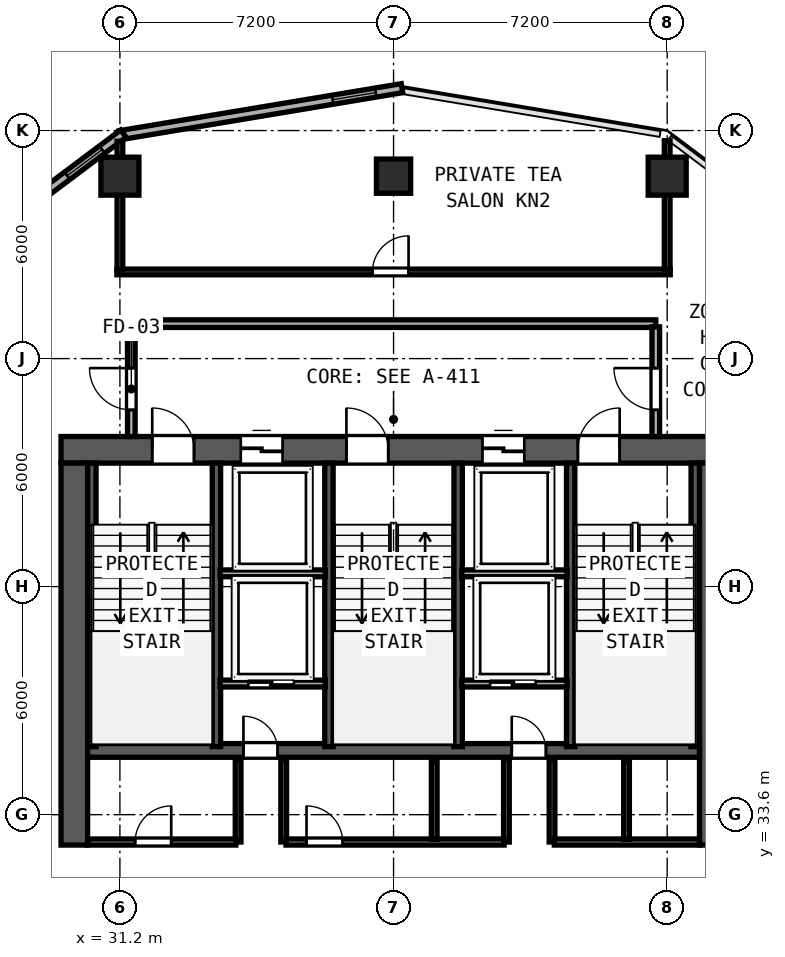
"""IFC4 building model, lengths in metres.
Left out: names, types, materials, properties, quantities, classifications, styles, units other than length and angle.
Written with IfcOpenShell. Run it as: python <this file> out.ifc"""

import sys

from ifc_helpers import new_model, si_unit, direction, frame, frame_2d, origin, origin_2d, place, context, subcontext, project, spatial, rectangle, hollow_rectangle, extrude, element, fill, save


model = new_model("IFC4")
c1 = context("Model", 3, precision=1e-05, world=origin(), true_north=direction((0.0, 1.0)))
c2 = subcontext(c1, "Body", "Model", "MODEL_VIEW")
j1 = project(units=[si_unit("LENGTHUNIT", "METRE"), si_unit("PLANEANGLEUNIT", "RADIAN")], contexts=[c1])
p1 = place(None, origin())
s1 = spatial("IfcSite", under=j1, at=p1, CompositionType="ELEMENT")
p2 = place(p1, origin())
s2 = spatial("IfcBuilding", under=s1, at=p2, CompositionType="ELEMENT")
p3 = place(p2, frame((0.0, 0.0, 128.8)))
s3 = spatial("IfcBuildingStorey", under=s2, at=p3, CompositionType="ELEMENT", Elevation=128.8)
p4 = place(p3, frame((29.65, 43.2, 0.0), z_axis=(0.0, 0.0, 1.0), x_axis=(1.0, 0.0, 0.0)))
e1 = element("IfcWall", 1, at=p4, inside=s3, PredefinedType="SHEAR", context=c2, shape_type="SweptSolid", body=[
    extrude(rectangle(XDim=17.5, YDim=0.7, at=frame_2d((8.75, 0.0))), origin(), (0.0, 0.0, 1.0), 3.6),
])
p5 = place(p4, frame((2.4, 0.0, 0.0)))
e2 = element("IfcOpeningElement", 2, at=p5, cuts=e1, PredefinedType="OPENING", context=c2, shape_type="SweptSolid", body=[
    extrude(rectangle(XDim=1.1, YDim=2.15, at=frame_2d((0.55, 1.075))), frame((0.0, 0.36, 0.0), z_axis=(0.0, -1.0, 0.0), x_axis=(1.0, 0.0, 0.0)), (0.0, 0.0, 1.0), 0.72),
])
p6 = place(p4, frame((7.51, 0.0, 0.0)))
e3 = element("IfcOpeningElement", 3, at=p6, cuts=e1, PredefinedType="OPENING", context=c2, shape_type="SweptSolid", body=[
    extrude(rectangle(XDim=1.1, YDim=2.15, at=frame_2d((0.55, 1.075))), frame((0.0, 0.36, 0.0), z_axis=(0.0, -1.0, 0.0), x_axis=(1.0, 0.0, 0.0)), (0.0, 0.0, 1.0), 0.72),
])
p7 = place(p4, frame((13.6, 0.0, 0.0)))
e4 = element("IfcOpeningElement", 4, at=p7, cuts=e1, PredefinedType="OPENING", context=c2, shape_type="SweptSolid", body=[
    extrude(rectangle(XDim=1.1, YDim=2.15, at=frame_2d((0.55, 1.075))), frame((0.0, 0.36, 0.0), z_axis=(0.0, -1.0, 0.0), x_axis=(1.0, 0.0, 0.0)), (0.0, 0.0, 1.0), 0.72),
])
p8 = place(p4, frame((4.73, 0.0, 0.0)))
e5 = element("IfcOpeningElement", 5, at=p8, cuts=e1, PredefinedType="OPENING", context=c2, shape_type="SweptSolid", body=[
    extrude(rectangle(XDim=1.1, YDim=2.2, at=frame_2d((0.55, 1.1))), frame((0.0, 0.36, 0.0), z_axis=(0.0, -1.0, 0.0), x_axis=(1.0, 0.0, 0.0)), (0.0, 0.0, 1.0), 0.72),
])
p9 = place(p4, frame((11.09, 0.0, 0.0)))
e6 = element("IfcOpeningElement", 6, at=p9, cuts=e1, PredefinedType="OPENING", context=c2, shape_type="SweptSolid", body=[
    extrude(rectangle(XDim=1.1, YDim=2.2, at=frame_2d((0.55, 1.1))), frame((0.0, 0.36, 0.0), z_axis=(0.0, -1.0, 0.0), x_axis=(1.0, 0.0, 0.0)), (0.0, 0.0, 1.0), 0.72),
])
for number, where, z_axis, x_axis in (
    (7, (30.0, 32.8, 0.0), (0.0, 0.0, 1.0), (0.0, 1.0, 0.0)),
    (8, (46.8, 32.8, 0.0), (0.0, 0.0, 1.0), (0.0, 1.0, 0.0)),
):
    element("IfcWall", number, at=place(p3, frame(where, z_axis=z_axis, x_axis=x_axis)), inside=s3, PredefinedType="SHEAR", context=c2, shape_type="SweptSolid", body=[
        extrude(rectangle(XDim=10.05, YDim=0.7, at=frame_2d((5.025, 0.0))), origin(), (0.0, 0.0, 1.0), 3.6),
    ])
p10 = place(p3, frame((30.35, 35.29, 0.0), z_axis=(0.0, 0.0, 1.0), x_axis=(1.0, 0.0, 0.0)))
e9 = element("IfcWall", 9, at=p10, inside=s3, PredefinedType="SHEAR", context=c2, shape_type="SweptSolid", body=[
    extrude(rectangle(XDim=16.1, YDim=0.36, at=frame_2d((8.05, 0.0))), origin(), (0.0, 0.0, 1.0), 3.6),
])
p11 = place(p10, frame((5.0, 0.0, 0.0), z_axis=(0.0, 0.0, 1.0), x_axis=(-1.0, 0.0, 0.0)))
e10 = element("IfcOpeningElement", 10, at=p11, cuts=e9, PredefinedType="OPENING", context=c2, shape_type="SweptSolid", body=[
    extrude(rectangle(XDim=0.9, YDim=2.1, at=frame_2d((0.45, 1.05))), frame((0.0, 0.19, 0.0), z_axis=(0.0, -1.0, 0.0), x_axis=(1.0, 0.0, 0.0)), (0.0, 0.0, 1.0), 0.38),
])
p12 = place(p10, frame((12.06, 0.0, 0.0), z_axis=(0.0, 0.0, 1.0), x_axis=(-1.0, 0.0, 0.0)))
e11 = element("IfcOpeningElement", 11, at=p12, cuts=e9, PredefinedType="OPENING", context=c2, shape_type="SweptSolid", body=[
    extrude(rectangle(XDim=0.9, YDim=2.1, at=frame_2d((0.45, 1.05))), frame((0.0, 0.19, 0.0), z_axis=(0.0, -1.0, 0.0), x_axis=(1.0, 0.0, 0.0)), (0.0, 0.0, 1.0), 0.38),
])
for number, where, z_axis, x_axis in (
    (12, (30.462, 35.39, 0.0), (0.0, 0.0, 1.0), (0.0, 1.0, 0.0)),
    (13, (33.74, 35.39, 0.0), (0.0, 0.0, 1.0), (0.0, 1.0, 0.0)),
    (14, (36.7, 35.39, 0.0), (0.0, 0.0, 1.0), (0.0, 1.0, 0.0)),
    (15, (40.1, 35.39, 0.0), (0.0, 0.0, 1.0), (0.0, 1.0, 0.0)),
    (16, (43.06, 35.39, 0.0), (0.0, 0.0, 1.0), (0.0, 1.0, 0.0)),
    (17, (46.338, 35.39, 0.0), (0.0, 0.0, 1.0), (0.0, 1.0, 0.0)),
):
    element("IfcWall", number, at=place(p3, frame(where, z_axis=z_axis, x_axis=x_axis)), inside=s3, PredefinedType="SHEAR", context=c2, shape_type="SweptSolid", body=[
        extrude(rectangle(XDim=7.46, YDim=0.22, at=frame_2d((3.73, 0.0))), origin(), (0.0, 0.0, 1.0), 3.6),
    ])
for number, where, z_axis, x_axis in (
    (18, (31.2, 50.4, 0.0), (0.0, 0.0, 1.0), (1.0, 0.0, 0.0)),
    (19, (45.6, 50.4, 0.0), (0.0, 0.0, 1.0), (1.0, 0.0, 0.0)),
):
    element("IfcColumn", number, at=place(p3, frame(where, z_axis=z_axis, x_axis=x_axis)), inside=s3, PredefinedType="COLUMN", context=c2, shape_type="SweptSolid", body=[
        extrude(hollow_rectangle(XDim=1.0, YDim=1.0, WallThickness=0.038, at=origin_2d()), origin(), (0.0, 0.0, 1.0), 3.8),
    ])
p13 = place(p3, frame((38.4, 50.4, 0.0), z_axis=(0.0, 0.0, 1.0), x_axis=(1.0, 0.0, 0.0)))
e20 = element("IfcColumn", 20, at=p13, inside=s3, PredefinedType="COLUMN", context=c2, shape_type="SweptSolid", body=[
    extrude(hollow_rectangle(XDim=0.9, YDim=0.9, WallThickness=0.034, at=origin_2d()), origin(), (0.0, 0.0, 1.0), 3.8),
])
p14 = place(p3, frame((38.622, 52.715, 0.0), z_axis=(0.0, 0.0, 1.0), x_axis=(-0.98639129485, -0.164414760418, 0.0)))
e21 = element("IfcWall", 21, at=p14, inside=s3, PredefinedType="SOLIDWALL", context=c2, shape_type="SweptSolid", body=[
    extrude(rectangle(XDim=7.53, YDim=0.24, at=frame_2d((3.765, 0.0))), origin(), (0.0, 0.0, 1.0), 3.6),
])
p15 = place(p14, frame((0.7, 0.0, 0.85)))
e22 = element("IfcOpeningElement", 22, at=p15, cuts=e21, PredefinedType="OPENING", context=c2, shape_type="SweptSolid", body=[
    extrude(rectangle(XDim=1.15, YDim=1.8, at=frame_2d((0.575, 0.9))), frame((0.0, 0.13, 0.0), z_axis=(0.0, -1.0, 0.0), x_axis=(1.0, 0.0, 0.0)), (0.0, 0.0, 1.0), 0.26),
])
p16 = place(p3, frame((31.292, 51.519, 0.0), z_axis=(0.0, 0.0, 1.0), x_axis=(-0.8, -0.6, 0.0)))
e23 = element("IfcWall", 23, at=p16, inside=s3, PredefinedType="SOLIDWALL", context=c2, shape_type="SweptSolid", body=[
    extrude(rectangle(XDim=6.021, YDim=0.24, at=frame_2d((3.01, 0.0))), origin(), (0.0, 0.0, 1.0), 3.6),
])
p17 = place(p16, frame((0.7, 0.0, 0.85)))
e24 = element("IfcOpeningElement", 24, at=p17, cuts=e23, PredefinedType="OPENING", context=c2, shape_type="SweptSolid", body=[
    extrude(rectangle(XDim=1.15, YDim=1.8, at=frame_2d((0.575, 0.9))), frame((0.0, 0.13, 0.0), z_axis=(0.0, -1.0, 0.0), x_axis=(1.0, 0.0, 0.0)), (0.0, 0.0, 1.0), 0.26),
])
p18 = place(p3, frame((31.5, 46.52, 0.0), z_axis=(0.0, 0.0, 1.0), x_axis=(1.0, 0.0, 0.0)))
e25 = element("IfcWall", 25, at=p18, inside=s3, PredefinedType="SOLIDWALL", context=c2, shape_type="SweptSolid", body=[
    extrude(rectangle(XDim=13.8, YDim=0.2, at=frame_2d((6.9, 0.0))), origin(), (0.0, 0.0, 1.0), 3.6),
])
p19 = place(p3, frame((31.5, 43.55, 0.0), z_axis=(0.0, 0.0, 1.0), x_axis=(0.0, 1.0, 0.0)))
e26 = element("IfcWall", 26, at=p19, inside=s3, PredefinedType="SOLIDWALL", context=c2, shape_type="SweptSolid", body=[
    extrude(rectangle(XDim=2.885, YDim=0.2, at=frame_2d((1.442, 0.0))), origin(), (0.0, 0.0, 1.0), 3.6),
])
p20 = place(p19, frame((1.8, 0.0, 0.0), z_axis=(0.0, 0.0, 1.0), x_axis=(-1.0, 0.0, 0.0)))
e27 = element("IfcOpeningElement", 27, at=p20, cuts=e26, PredefinedType="OPENING", context=c2, shape_type="SweptSolid", body=[
    extrude(rectangle(XDim=1.1, YDim=2.15, at=frame_2d((0.55, 1.075))), frame((0.0, 0.11, 0.0), z_axis=(0.0, -1.0, 0.0), x_axis=(1.0, 0.0, 0.0)), (0.0, 0.0, 1.0), 0.22),
])
p21 = place(p3, frame((45.3, 43.55, 0.0), z_axis=(0.0, 0.0, 1.0), x_axis=(0.0, 1.0, 0.0)))
e28 = element("IfcWall", 28, at=p21, inside=s3, PredefinedType="SOLIDWALL", context=c2, shape_type="SweptSolid", body=[
    extrude(rectangle(XDim=2.885, YDim=0.2, at=frame_2d((1.442, 0.0))), origin(), (0.0, 0.0, 1.0), 3.6),
])
p22 = place(p21, frame((0.7, 0.0, 0.0)))
e29 = element("IfcOpeningElement", 29, at=p22, cuts=e28, PredefinedType="OPENING", context=c2, shape_type="SweptSolid", body=[
    extrude(rectangle(XDim=1.1, YDim=2.15, at=frame_2d((0.55, 1.075))), frame((0.0, 0.11, 0.0), z_axis=(0.0, -1.0, 0.0), x_axis=(1.0, 0.0, 0.0)), (0.0, 0.0, 1.0), 0.22),
])
for number, where, z_axis, x_axis in (
    (30, (33.835, 39.95, 0.0), (0.0, 0.0, 1.0), (1.0, 0.0, 0.0)),
    (31, (40.195, 39.95, 0.0), (0.0, 0.0, 1.0), (1.0, 0.0, 0.0)),
):
    element("IfcWall", number, at=place(p3, frame(where, z_axis=z_axis, x_axis=x_axis)), inside=s3, PredefinedType="SOLIDWALL", context=c2, shape_type="SweptSolid", body=[
        extrude(rectangle(XDim=2.77, YDim=0.18, at=frame_2d((1.385, 0.0))), origin(), (0.0, 0.0, 1.0), 3.6),
    ])
p23 = place(p3, frame((33.835, 37.05, 0.0), z_axis=(0.0, 0.0, 1.0), x_axis=(1.0, 0.0, 0.0)))
e32 = element("IfcWall", 32, at=p23, inside=s3, PredefinedType="SOLIDWALL", context=c2, shape_type="SweptSolid", body=[
    extrude(rectangle(XDim=2.77, YDim=0.18, at=frame_2d((1.385, 0.0))), origin(), (0.0, 0.0, 1.0), 3.6),
])
p24 = place(p23, frame((1.945, 0.0, 0.0), z_axis=(0.0, 0.0, 1.0), x_axis=(-1.0, 0.0, 0.0)))
e33 = element("IfcOpeningElement", 33, at=p24, cuts=e32, PredefinedType="OPENING", context=c2, shape_type="SweptSolid", body=[
    extrude(rectangle(XDim=1.2, YDim=2.2, at=frame_2d((0.6, 1.1))), frame((0.0, 0.1, 0.0), z_axis=(0.0, -1.0, 0.0), x_axis=(1.0, 0.0, 0.0)), (0.0, 0.0, 1.0), 0.2),
])
for number, where, z_axis, x_axis in (
    (34, (34.31, 32.88, 0.0), (0.0, 0.0, 1.0), (0.0, 1.0, 0.0)),
    (35, (35.51, 32.88, 0.0), (0.0, 0.0, 1.0), (0.0, 1.0, 0.0)),
):
    element("IfcWall", number, at=place(p3, frame(where, z_axis=z_axis, x_axis=x_axis)), inside=s3, PredefinedType="SOLIDWALL", context=c2, shape_type="SweptSolid", body=[
        extrude(rectangle(XDim=2.17, YDim=0.15, at=frame_2d((1.085, 0.0))), origin(), (0.0, 0.0, 1.0), 3.6),
    ])
p25 = place(p3, frame((40.195, 37.05, 0.0), z_axis=(0.0, 0.0, 1.0), x_axis=(1.0, 0.0, 0.0)))
e36 = element("IfcWall", 36, at=p25, inside=s3, PredefinedType="SOLIDWALL", context=c2, shape_type="SweptSolid", body=[
    extrude(rectangle(XDim=2.77, YDim=0.18, at=frame_2d((1.385, 0.0))), origin(), (0.0, 0.0, 1.0), 3.6),
])
p26 = place(p25, frame((1.945, 0.0, 0.0), z_axis=(0.0, 0.0, 1.0), x_axis=(-1.0, 0.0, 0.0)))
e37 = element("IfcOpeningElement", 37, at=p26, cuts=e36, PredefinedType="OPENING", context=c2, shape_type="SweptSolid", body=[
    extrude(rectangle(XDim=1.2, YDim=2.2, at=frame_2d((0.6, 1.1))), frame((0.0, 0.1, 0.0), z_axis=(0.0, -1.0, 0.0), x_axis=(1.0, 0.0, 0.0)), (0.0, 0.0, 1.0), 0.2),
])
for number, where, z_axis, x_axis in (
    (38, (41.37, 32.88, 0.0), (0.0, 0.0, 1.0), (0.0, 1.0, 0.0)),
    (39, (42.57, 32.88, 0.0), (0.0, 0.0, 1.0), (0.0, 1.0, 0.0)),
):
    element("IfcWall", number, at=place(p3, frame(where, z_axis=z_axis, x_axis=x_axis)), inside=s3, PredefinedType="SOLIDWALL", context=c2, shape_type="SweptSolid", body=[
        extrude(rectangle(XDim=2.17, YDim=0.15, at=frame_2d((1.085, 0.0))), origin(), (0.0, 0.0, 1.0), 3.6),
    ])
p27 = place(p3, frame((30.35, 32.88, 0.0), z_axis=(0.0, 0.0, 1.0), x_axis=(1.0, 0.0, 0.0)))
e40 = element("IfcWall", 40, at=p27, inside=s3, PredefinedType="SOLIDWALL", context=c2, shape_type="SweptSolid", body=[
    extrude(rectangle(XDim=3.9, YDim=0.16, at=frame_2d((1.95, 0.0))), origin(), (0.0, 0.0, 1.0), 3.6),
])
p28 = place(p27, frame((2.2, 0.0, 0.0), z_axis=(0.0, 0.0, 1.0), x_axis=(-1.0, 0.0, 0.0)))
e41 = element("IfcOpeningElement", 41, at=p28, cuts=e40, PredefinedType="OPENING", context=c2, shape_type="SweptSolid", body=[
    extrude(rectangle(XDim=0.95, YDim=2.12, at=frame_2d((0.475, 1.06))), frame((0.0, 0.09, 0.0), z_axis=(0.0, -1.0, 0.0), x_axis=(1.0, 0.0, 0.0)), (0.0, 0.0, 1.0), 0.18),
])
p29 = place(p3, frame((35.57, 32.88, 0.0), z_axis=(0.0, 0.0, 1.0), x_axis=(1.0, 0.0, 0.0)))
e42 = element("IfcWall", 42, at=p29, inside=s3, PredefinedType="SOLIDWALL", context=c2, shape_type="SweptSolid", body=[
    extrude(rectangle(XDim=5.74, YDim=0.16, at=frame_2d((2.87, 0.0))), origin(), (0.0, 0.0, 1.0), 3.6),
])
p30 = place(p29, frame((1.49, 0.0, 0.0), z_axis=(0.0, 0.0, 1.0), x_axis=(-1.0, 0.0, 0.0)))
e43 = element("IfcOpeningElement", 43, at=p30, cuts=e42, PredefinedType="OPENING", context=c2, shape_type="SweptSolid", body=[
    extrude(rectangle(XDim=0.95, YDim=2.12, at=frame_2d((0.475, 1.06))), frame((0.0, 0.09, 0.0), z_axis=(0.0, -1.0, 0.0), x_axis=(1.0, 0.0, 0.0)), (0.0, 0.0, 1.0), 0.18),
])
p31 = place(p3, frame((42.63, 32.88, 0.0), z_axis=(0.0, 0.0, 1.0), x_axis=(1.0, 0.0, 0.0)))
e44 = element("IfcWall", 44, at=p31, inside=s3, PredefinedType="SOLIDWALL", context=c2, shape_type="SweptSolid", body=[
    extrude(rectangle(XDim=3.82, YDim=0.16, at=frame_2d((1.91, 0.0))), origin(), (0.0, 0.0, 1.0), 3.6),
])
for number, where, z_axis, x_axis in (
    (45, (39.47, 32.95, 0.0), (0.0, 0.0, 1.0), (0.0, 1.0, 0.0)),
    (46, (44.53, 32.95, 0.0), (0.0, 0.0, 1.0), (0.0, 1.0, 0.0)),
):
    element("IfcWall", number, at=place(p3, frame(where, z_axis=z_axis, x_axis=x_axis)), inside=s3, PredefinedType="SOLIDWALL", context=c2, shape_type="SweptSolid", body=[
        extrude(rectangle(XDim=2.05, YDim=0.15, at=frame_2d((1.025, 0.0))), origin(), (0.0, 0.0, 1.0), 3.6),
    ])
p32 = place(p3, frame((31.12, 47.88, 0.0), z_axis=(0.0, 0.0, 1.0), x_axis=(1.0, 0.0, 0.0)))
e47 = element("IfcWall", 47, at=p32, inside=s3, PredefinedType="PARTITIONING", context=c2, shape_type="SweptSolid", body=[
    extrude(rectangle(XDim=14.56, YDim=0.15, at=frame_2d((7.28, 0.0))), origin(), (0.0, 0.0, 1.0), 3.6),
])
p33 = place(p32, frame((6.725, 0.0, 0.0)))
e48 = element("IfcOpeningElement", 48, at=p33, cuts=e47, PredefinedType="OPENING", context=c2, shape_type="SweptSolid", body=[
    extrude(rectangle(XDim=0.95, YDim=2.12, at=frame_2d((0.475, 1.06))), frame((0.0, 0.085, 0.0), z_axis=(0.0, -1.0, 0.0), x_axis=(1.0, 0.0, 0.0)), (0.0, 0.0, 1.0), 0.17),
])
p34 = place(p3, frame((31.2, 47.94, 0.0), z_axis=(0.0, 0.0, 1.0), x_axis=(0.0, 1.0, 0.0)))
e49 = element("IfcWall", 49, at=p34, inside=s3, PredefinedType="PARTITIONING", context=c2, shape_type="SweptSolid", body=[
    extrude(rectangle(XDim=3.379, YDim=0.15, at=frame_2d((1.689, 0.0))), origin(), (0.0, 0.0, 1.0), 3.085),
])
p35 = place(p3, frame((45.6, 47.94, 0.0), z_axis=(0.0, 0.0, 1.0), x_axis=(0.0, 1.0, 0.0)))
e50 = element("IfcWall", 50, at=p35, inside=s3, PredefinedType="PARTITIONING", context=c2, shape_type="SweptSolid", body=[
    extrude(rectangle(XDim=3.395, YDim=0.15, at=frame_2d((1.698, 0.0))), origin(), (0.0, 0.0, 1.0), 3.085),
])
p36 = place(p15, origin())
e51 = element("IfcWindow", 51, at=p36, inside=s3, PartitioningType="SINGLE_PANEL", PredefinedType="WINDOW", context=c2, shape_type="SweptSolid", body=[
    extrude(rectangle(XDim=1.15, YDim=1.8, at=frame_2d((0.575, 0.9))), frame((0.0, 0.03, 0.0), z_axis=(0.0, -1.0, 0.0), x_axis=(1.0, 0.0, 0.0)), (0.0, 0.0, 1.0), 0.06),
])
fill(e22, e51)
p37 = place(p17, origin())
e52 = element("IfcWindow", 52, at=p37, inside=s3, PartitioningType="SINGLE_PANEL", PredefinedType="WINDOW", context=c2, shape_type="SweptSolid", body=[
    extrude(rectangle(XDim=1.15, YDim=1.8, at=frame_2d((0.575, 0.9))), frame((0.0, 0.03, 0.0), z_axis=(0.0, -1.0, 0.0), x_axis=(1.0, 0.0, 0.0)), (0.0, 0.0, 1.0), 0.06),
])
fill(e24, e52)
p38 = place(p5, origin())
e53 = element("IfcDoor", 53, at=p38, inside=s3, OperationType="SINGLE_SWING_LEFT", PredefinedType="DOOR", context=c2, shape_type="SweptSolid", body=[
    extrude(rectangle(XDim=1.1, YDim=2.15, at=frame_2d((0.55, 1.075))), frame((0.0, 0.185, 0.0), z_axis=(0.0, -1.0, 0.0), x_axis=(1.0, 0.0, 0.0)), (0.0, 0.0, 1.0), 0.05),
])
fill(e2, e53)
p39 = place(p6, origin())
e54 = element("IfcDoor", 54, at=p39, inside=s3, OperationType="SINGLE_SWING_LEFT", PredefinedType="DOOR", context=c2, shape_type="SweptSolid", body=[
    extrude(rectangle(XDim=1.1, YDim=2.15, at=frame_2d((0.55, 1.075))), frame((0.0, 0.185, 0.0), z_axis=(0.0, -1.0, 0.0), x_axis=(1.0, 0.0, 0.0)), (0.0, 0.0, 1.0), 0.05),
])
fill(e3, e54)
p40 = place(p7, origin())
e55 = element("IfcDoor", 55, at=p40, inside=s3, OperationType="SINGLE_SWING_RIGHT", PredefinedType="DOOR", context=c2, shape_type="SweptSolid", body=[
    extrude(rectangle(XDim=1.1, YDim=2.15, at=frame_2d((0.55, 1.075))), frame((0.0, 0.185, 0.0), z_axis=(0.0, -1.0, 0.0), x_axis=(1.0, 0.0, 0.0)), (0.0, 0.0, 1.0), 0.05),
])
fill(e4, e55)
p41 = place(p20, origin())
e56 = element("IfcDoor", 56, at=p41, inside=s3, OperationType="SINGLE_SWING_LEFT", PredefinedType="DOOR", context=c2, shape_type="SweptSolid", body=[
    extrude(rectangle(XDim=1.1, YDim=2.15, at=frame_2d((0.55, 1.075))), frame((0.0, 0.025, 0.0), z_axis=(0.0, -1.0, 0.0), x_axis=(1.0, 0.0, 0.0)), (0.0, 0.0, 1.0), 0.05),
])
fill(e27, e56)
p42 = place(p22, origin())
e57 = element("IfcDoor", 57, at=p42, inside=s3, OperationType="SINGLE_SWING_RIGHT", PredefinedType="DOOR", context=c2, shape_type="SweptSolid", body=[
    extrude(rectangle(XDim=1.1, YDim=2.15, at=frame_2d((0.55, 1.075))), frame((0.0, 0.025, 0.0), z_axis=(0.0, -1.0, 0.0), x_axis=(1.0, 0.0, 0.0)), (0.0, 0.0, 1.0), 0.05),
])
fill(e29, e57)
p43 = place(p8, origin())
e58 = element("IfcDoor", 58, at=p43, inside=s3, OperationType="SLIDING_TO_LEFT", PredefinedType="DOOR", context=c2, shape_type="SweptSolid", body=[
    extrude(rectangle(XDim=1.1, YDim=2.2, at=frame_2d((0.55, 1.1))), frame((0.0, 0.185, 0.0), z_axis=(0.0, -1.0, 0.0), x_axis=(1.0, 0.0, 0.0)), (0.0, 0.0, 1.0), 0.05),
])
fill(e5, e58)
p44 = place(p9, origin())
e59 = element("IfcDoor", 59, at=p44, inside=s3, OperationType="SLIDING_TO_LEFT", PredefinedType="DOOR", context=c2, shape_type="SweptSolid", body=[
    extrude(rectangle(XDim=1.1, YDim=2.2, at=frame_2d((0.55, 1.1))), frame((0.0, 0.185, 0.0), z_axis=(0.0, -1.0, 0.0), x_axis=(1.0, 0.0, 0.0)), (0.0, 0.0, 1.0), 0.05),
])
fill(e6, e59)
p45 = place(p24, origin())
e60 = element("IfcDoor", 60, at=p45, inside=s3, OperationType="SLIDING_TO_RIGHT", PredefinedType="DOOR", context=c2, shape_type="SweptSolid", body=[
    extrude(rectangle(XDim=1.2, YDim=2.2, at=frame_2d((0.6, 1.1))), frame((0.0, 0.025, 0.0), z_axis=(0.0, -1.0, 0.0), x_axis=(1.0, 0.0, 0.0)), (0.0, 0.0, 1.0), 0.05),
])
fill(e33, e60)
p46 = place(p11, origin())
e61 = element("IfcDoor", 61, at=p46, inside=s3, OperationType="SINGLE_SWING_RIGHT", PredefinedType="DOOR", context=c2, shape_type="SweptSolid", body=[
    extrude(rectangle(XDim=0.9, YDim=2.1, at=frame_2d((0.45, 1.05))), frame((0.0, 0.025, 0.0), z_axis=(0.0, -1.0, 0.0), x_axis=(1.0, 0.0, 0.0)), (0.0, 0.0, 1.0), 0.05),
])
fill(e10, e61)
p47 = place(p26, origin())
e62 = element("IfcDoor", 62, at=p47, inside=s3, OperationType="SLIDING_TO_RIGHT", PredefinedType="DOOR", context=c2, shape_type="SweptSolid", body=[
    extrude(rectangle(XDim=1.2, YDim=2.2, at=frame_2d((0.6, 1.1))), frame((0.0, 0.025, 0.0), z_axis=(0.0, -1.0, 0.0), x_axis=(1.0, 0.0, 0.0)), (0.0, 0.0, 1.0), 0.05),
])
fill(e37, e62)
p48 = place(p12, origin())
e63 = element("IfcDoor", 63, at=p48, inside=s3, OperationType="SINGLE_SWING_RIGHT", PredefinedType="DOOR", context=c2, shape_type="SweptSolid", body=[
    extrude(rectangle(XDim=0.9, YDim=2.1, at=frame_2d((0.45, 1.05))), frame((0.0, 0.025, 0.0), z_axis=(0.0, -1.0, 0.0), x_axis=(1.0, 0.0, 0.0)), (0.0, 0.0, 1.0), 0.05),
])
fill(e11, e63)
p49 = place(p28, origin())
e64 = element("IfcDoor", 64, at=p49, inside=s3, OperationType="SINGLE_SWING_LEFT", PredefinedType="DOOR", context=c2, shape_type="SweptSolid", body=[
    extrude(rectangle(XDim=0.95, YDim=2.12, at=frame_2d((0.475, 1.06))), frame((0.0, 0.025, 0.0), z_axis=(0.0, -1.0, 0.0), x_axis=(1.0, 0.0, 0.0)), (0.0, 0.0, 1.0), 0.05),
])
fill(e41, e64)
p50 = place(p30, origin())
e65 = element("IfcDoor", 65, at=p50, inside=s3, OperationType="SINGLE_SWING_RIGHT", PredefinedType="DOOR", context=c2, shape_type="SweptSolid", body=[
    extrude(rectangle(XDim=0.95, YDim=2.12, at=frame_2d((0.475, 1.06))), frame((0.0, 0.025, 0.0), z_axis=(0.0, -1.0, 0.0), x_axis=(1.0, 0.0, 0.0)), (0.0, 0.0, 1.0), 0.05),
])
fill(e43, e65)
p51 = place(p33, origin())
e66 = element("IfcDoor", 66, at=p51, inside=s3, OperationType="SINGLE_SWING_RIGHT", PredefinedType="DOOR", context=c2, shape_type="SweptSolid", body=[
    extrude(rectangle(XDim=0.95, YDim=2.12, at=frame_2d((0.475, 1.06))), frame((0.0, 0.025, 0.0), z_axis=(0.0, -1.0, 0.0), x_axis=(1.0, 0.0, 0.0)), (0.0, 0.0, 1.0), 0.05),
])
fill(e48, e66)
save(model, sys.argv[1])
